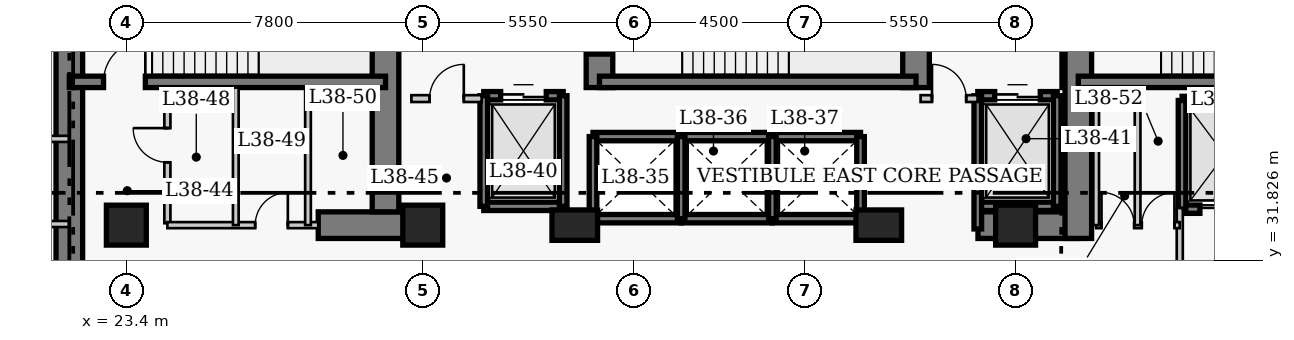
"""IFC4 building model, lengths in metres.
Left out: names, types, materials, properties, quantities, classifications, styles, units other than length and angle.
Written with IfcOpenShell. Run it as: python <this file> out.ifc"""

import sys

from ifc_helpers import new_model, si_unit, direction, frame, frame_2d, origin, origin_2d, place, context, subcontext, project, spatial, rectangle, extrude, element, fill, save


model = new_model("IFC4")
c1 = context("Model", 3, precision=1e-05, world=origin(), true_north=direction((0.0, 1.0)))
c2 = subcontext(c1, "Body", "Model", "MODEL_VIEW")
j1 = project(units=[si_unit("LENGTHUNIT", "METRE"), si_unit("PLANEANGLEUNIT", "RADIAN")], contexts=[c1])
p1 = place(None, origin())
s1 = spatial("IfcSite", under=j1, at=p1, CompositionType="ELEMENT")
p2 = place(p1, origin())
s2 = spatial("IfcBuilding", under=s1, at=p2, CompositionType="ELEMENT")
p3 = place(p2, frame((0.0, 0.0, 153.6)))
s3 = spatial("IfcBuildingStorey", under=s2, at=p3, CompositionType="ELEMENT", Elevation=153.6)
p4 = place(p3, frame((21.9, 27.05, 0.0), z_axis=(0.0, 0.0, 1.0), x_axis=(0.0, 1.0, 0.0)))
e1 = element("IfcWall", 1, at=p4, inside=s3, PredefinedType="SHEAR", context=c2, shape_type="SweptSolid", body=[
    extrude(rectangle(XDim=13.62, YDim=0.7, at=frame_2d((6.81, 0.0))), origin(), (0.0, 0.0, 1.0), 3.8),
])
p5 = place(p3, frame((28.45, 32.75, 0.0), z_axis=(0.0, 0.0, 1.0), x_axis=(1.0, 0.0, 0.0)))
e2 = element("IfcWall", 2, at=p5, inside=s3, PredefinedType="SHEAR", context=c2, shape_type="SweptSolid", body=[
    extrude(rectangle(XDim=2.4, YDim=0.7, at=frame_2d((1.2, 0.0))), origin(), (0.0, 0.0, 1.0), 3.8),
])
p6 = place(p3, frame((45.81, 32.75, 0.0), z_axis=(0.0, 0.0, 1.0), x_axis=(1.0, 0.0, 0.0)))
e3 = element("IfcWall", 3, at=p6, inside=s3, PredefinedType="SHEAR", context=c2, shape_type="SweptSolid", body=[
    extrude(rectangle(XDim=2.64, YDim=0.7, at=frame_2d((1.32, 0.0))), origin(), (0.0, 0.0, 1.0), 3.8),
])
p7 = place(p3, frame((30.22, 33.1, 0.0), z_axis=(0.0, 0.0, 1.0), x_axis=(0.0, 1.0, 0.0)))
e4 = element("IfcWall", 4, at=p7, inside=s3, PredefinedType="SHEAR", context=c2, shape_type="SweptSolid", body=[
    extrude(rectangle(XDim=7.22, YDim=0.7, at=frame_2d((3.61, 0.0))), origin(), (0.0, 0.0, 1.0), 3.8),
])
p8 = place(p3, frame((35.85, 36.37, 0.0), z_axis=(0.0, 0.0, 1.0), x_axis=(0.0, 1.0, 0.0)))
e5 = element("IfcWall", 5, at=p8, inside=s3, PredefinedType="SHEAR", context=c2, shape_type="SweptSolid", body=[
    extrude(rectangle(XDim=3.95, YDim=0.7, at=frame_2d((1.975, 0.0))), origin(), (0.0, 0.0, 1.0), 3.8),
])
p9 = place(p8, frame((0.88, 0.0, 0.0)))
e6 = element("IfcOpeningElement", 6, at=p9, cuts=e5, PredefinedType="OPENING", context=c2, shape_type="SweptSolid", body=[
    extrude(rectangle(XDim=1.1, YDim=2.15, at=frame_2d((0.55, 1.075))), frame((0.0, 0.36, 0.0), z_axis=(0.0, -1.0, 0.0), x_axis=(1.0, 0.0, 0.0)), (0.0, 0.0, 1.0), 0.72),
])
p10 = place(p3, frame((44.18, 36.37, 0.0), z_axis=(0.0, 0.0, 1.0), x_axis=(0.0, 1.0, 0.0)))
e7 = element("IfcWall", 7, at=p10, inside=s3, PredefinedType="SHEAR", context=c2, shape_type="SweptSolid", body=[
    extrude(rectangle(XDim=3.95, YDim=0.7, at=frame_2d((1.975, 0.0))), origin(), (0.0, 0.0, 1.0), 3.8),
])
p11 = place(p3, frame((48.45, 32.4, 0.0), z_axis=(0.0, 0.0, 1.0), x_axis=(0.0, 1.0, 0.0)))
e8 = element("IfcWall", 8, at=p11, inside=s3, PredefinedType="SHEAR", context=c2, shape_type="SweptSolid", body=[
    extrude(rectangle(XDim=7.92, YDim=0.7, at=frame_2d((3.96, 0.0))), origin(), (0.0, 0.0, 1.0), 3.8),
])
p12 = place(p11, frame((5.8, 0.0, 0.0)))
e9 = element("IfcOpeningElement", 9, at=p12, cuts=e8, PredefinedType="OPENING", context=c2, shape_type="SweptSolid", body=[
    extrude(rectangle(XDim=1.1, YDim=2.15, at=frame_2d((0.55, 1.075))), frame((0.0, 0.36, 0.0), z_axis=(0.0, -1.0, 0.0), x_axis=(1.0, 0.0, 0.0)), (0.0, 0.0, 1.0), 0.72),
])
p13 = place(p3, frame((21.9, 36.52, 0.0), z_axis=(0.0, 0.0, 1.0), x_axis=(1.0, 0.0, 0.0)))
e10 = element("IfcWall", 10, at=p13, inside=s3, PredefinedType="SHEAR", context=c2, shape_type="SweptSolid", body=[
    extrude(rectangle(XDim=8.32, YDim=0.3, at=frame_2d((4.16, 0.0))), origin(), (0.0, 0.0, 1.0), 3.8),
])
p14 = place(p13, frame((0.9, 0.0, 0.0)))
e11 = element("IfcOpeningElement", 11, at=p14, cuts=e10, PredefinedType="OPENING", context=c2, shape_type="SweptSolid", body=[
    extrude(rectangle(XDim=1.1, YDim=2.15, at=frame_2d((0.55, 1.075))), frame((0.0, 0.16, 0.0), z_axis=(0.0, -1.0, 0.0), x_axis=(1.0, 0.0, 0.0)), (0.0, 0.0, 1.0), 0.32),
])
p15 = place(p3, frame((35.85, 36.52, 0.0), z_axis=(0.0, 0.0, 1.0), x_axis=(1.0, 0.0, 0.0)))
e12 = element("IfcWall", 12, at=p15, inside=s3, PredefinedType="SHEAR", context=c2, shape_type="SweptSolid", body=[
    extrude(rectangle(XDim=8.33, YDim=0.3, at=frame_2d((4.165, 0.0))), origin(), (0.0, 0.0, 1.0), 3.8),
])
p16 = place(p3, frame((48.45, 36.52, 0.0), z_axis=(0.0, 0.0, 1.0), x_axis=(1.0, 0.0, 0.0)))
e13 = element("IfcWall", 13, at=p16, inside=s3, PredefinedType="SHEAR", context=c2, shape_type="SweptSolid", body=[
    extrude(rectangle(XDim=8.42, YDim=0.3, at=frame_2d((4.21, 0.0))), origin(), (0.0, 0.0, 1.0), 3.8),
])
for number, where, z_axis, x_axis in (
    (14, (23.4, 32.75, 0.0), (0.0, 0.0, 1.0), (1.0, 0.0, 0.0)),
    (15, (31.2, 32.75, 0.0), (0.0, 0.0, 1.0), (1.0, 0.0, 0.0)),
):
    element("IfcColumn", number, at=place(p3, frame(where, z_axis=z_axis, x_axis=x_axis)), inside=s3, PredefinedType="COLUMN", context=c2, shape_type="SweptSolid", body=[
        extrude(rectangle(XDim=1.05, YDim=1.05, at=origin_2d()), origin(), (0.0, 0.0, 1.0), 3.8),
    ])
for number, where, z_axis, x_axis in (
    (16, (35.2, 32.75, 0.0), (0.0, 0.0, 1.0), (1.0, 0.0, 0.0)),
    (17, (43.2, 32.75, 0.0), (0.0, 0.0, 1.0), (1.0, 0.0, 0.0)),
):
    element("IfcColumn", number, at=place(p3, frame(where, z_axis=z_axis, x_axis=x_axis)), inside=s3, PredefinedType="COLUMN", context=c2, shape_type="SweptSolid", body=[
        extrude(rectangle(XDim=1.2, YDim=0.8, at=origin_2d()), origin(), (0.0, 0.0, 1.0), 3.8),
    ])
p17 = place(p3, frame((46.8, 32.75, 0.0), z_axis=(0.0, 0.0, 1.0), x_axis=(1.0, 0.0, 0.0)))
e18 = element("IfcColumn", 18, at=p17, inside=s3, PredefinedType="COLUMN", context=c2, shape_type="SweptSolid", body=[
    extrude(rectangle(XDim=1.05, YDim=1.05, at=origin_2d()), origin(), (0.0, 0.0, 1.0), 3.8),
])
for number, where, z_axis, x_axis in (
    (19, (35.68, 35.08, 0.0), (0.0, 0.0, 1.0), (1.0, 0.0, 0.0)),
    (20, (35.68, 32.92, 0.0), (0.0, 0.0, 1.0), (1.0, 0.0, 0.0)),
):
    element("IfcWall", number, at=place(p3, frame(where, z_axis=z_axis, x_axis=x_axis)), inside=s3, PredefinedType="SHEAR", context=c2, shape_type="SweptSolid", body=[
        extrude(rectangle(XDim=2.32, YDim=0.22, at=frame_2d((1.16, 0.0))), origin(), (0.0, 0.0, 1.0), 3.8),
    ])
p18 = place(p3, frame((35.68, 32.92, 0.0), z_axis=(0.0, 0.0, 1.0), x_axis=(0.0, 1.0, 0.0)))
e21 = element("IfcWall", 21, at=p18, inside=s3, PredefinedType="SHEAR", context=c2, shape_type="SweptSolid", body=[
    extrude(rectangle(XDim=2.16, YDim=0.2, at=frame_2d((1.08, 0.0))), origin(), (0.0, 0.0, 1.0), 3.8),
])
for number, where, z_axis, x_axis in (
    (22, (38.0, 35.08, 0.0), (0.0, 0.0, 1.0), (1.0, 0.0, 0.0)),
    (23, (38.0, 32.92, 0.0), (0.0, 0.0, 1.0), (1.0, 0.0, 0.0)),
):
    element("IfcWall", number, at=place(p3, frame(where, z_axis=z_axis, x_axis=x_axis)), inside=s3, PredefinedType="SHEAR", context=c2, shape_type="SweptSolid", body=[
        extrude(rectangle(XDim=2.4, YDim=0.22, at=frame_2d((1.2, 0.0))), origin(), (0.0, 0.0, 1.0), 3.8),
    ])
p19 = place(p3, frame((38.0, 32.92, 0.0), z_axis=(0.0, 0.0, 1.0), x_axis=(0.0, 1.0, 0.0)))
e24 = element("IfcWall", 24, at=p19, inside=s3, PredefinedType="SHEAR", context=c2, shape_type="SweptSolid", body=[
    extrude(rectangle(XDim=2.16, YDim=0.2, at=frame_2d((1.08, 0.0))), origin(), (0.0, 0.0, 1.0), 3.8),
])
for number, where, z_axis, x_axis in (
    (25, (40.4, 35.08, 0.0), (0.0, 0.0, 1.0), (1.0, 0.0, 0.0)),
    (26, (40.4, 32.92, 0.0), (0.0, 0.0, 1.0), (1.0, 0.0, 0.0)),
):
    element("IfcWall", number, at=place(p3, frame(where, z_axis=z_axis, x_axis=x_axis)), inside=s3, PredefinedType="SHEAR", context=c2, shape_type="SweptSolid", body=[
        extrude(rectangle(XDim=2.32, YDim=0.22, at=frame_2d((1.16, 0.0))), origin(), (0.0, 0.0, 1.0), 3.8),
    ])
for number, where, z_axis, x_axis in (
    (27, (40.4, 32.92, 0.0), (0.0, 0.0, 1.0), (0.0, 1.0, 0.0)),
    (28, (42.72, 32.92, 0.0), (0.0, 0.0, 1.0), (0.0, 1.0, 0.0)),
):
    element("IfcWall", number, at=place(p3, frame(where, z_axis=z_axis, x_axis=x_axis)), inside=s3, PredefinedType="SHEAR", context=c2, shape_type="SweptSolid", body=[
        extrude(rectangle(XDim=2.16, YDim=0.2, at=frame_2d((1.08, 0.0))), origin(), (0.0, 0.0, 1.0), 3.8),
    ])
p20 = place(p3, frame((51.18, 36.03, 0.0), z_axis=(0.0, 0.0, 1.0), x_axis=(1.0, 0.0, 0.0)))
e29 = element("IfcWall", 29, at=p20, inside=s3, PredefinedType="SHEAR", context=c2, shape_type="SweptSolid", body=[
    extrude(rectangle(XDim=2.42, YDim=0.22, at=frame_2d((1.21, 0.0))), origin(), (0.0, 0.0, 1.0), 3.8),
])
p21 = place(p3, frame((51.18, 33.17, 0.0), z_axis=(0.0, 0.0, 1.0), x_axis=(1.0, 0.0, 0.0)))
e30 = element("IfcWall", 30, at=p21, inside=s3, PredefinedType="SHEAR", context=c2, shape_type="SweptSolid", body=[
    extrude(rectangle(XDim=2.42, YDim=0.22, at=frame_2d((1.21, 0.0))), origin(), (0.0, 0.0, 1.0), 3.8),
])
p22 = place(p21, frame((0.47, 0.0, 0.0)))
e31 = element("IfcOpeningElement", 31, at=p22, cuts=e30, PredefinedType="OPENING", context=c2, shape_type="SweptSolid", body=[
    extrude(rectangle(XDim=1.3, YDim=2.15, at=frame_2d((0.65, 1.075))), frame((0.0, 0.12, 0.0), z_axis=(0.0, -1.0, 0.0), x_axis=(1.0, 0.0, 0.0)), (0.0, 0.0, 1.0), 0.24),
])
p23 = place(p3, frame((51.18, 33.17, 0.0), z_axis=(0.0, 0.0, 1.0), x_axis=(0.0, 1.0, 0.0)))
e32 = element("IfcWall", 32, at=p23, inside=s3, PredefinedType="SHEAR", context=c2, shape_type="SweptSolid", body=[
    extrude(rectangle(XDim=2.86, YDim=0.2, at=frame_2d((1.43, 0.0))), origin(), (0.0, 0.0, 1.0), 3.8),
])
p24 = place(p3, frame((32.805, 36.155, 0.0), z_axis=(0.0, 0.0, 1.0), x_axis=(1.0, 0.0, 0.0)))
e33 = element("IfcWall", 33, at=p24, inside=s3, PredefinedType="SHEAR", context=c2, shape_type="SweptSolid", body=[
    extrude(rectangle(XDim=2.09, YDim=0.22, at=frame_2d((1.045, 0.0))), origin(), (0.0, 0.0, 1.0), 3.8),
])
p25 = place(p24, frame((0.445, 0.0, 0.0)))
e34 = element("IfcOpeningElement", 34, at=p25, cuts=e33, PredefinedType="OPENING", context=c2, shape_type="SweptSolid", body=[
    extrude(rectangle(XDim=1.2, YDim=2.15, at=frame_2d((0.6, 1.075))), frame((0.0, 0.12, 0.0), z_axis=(0.0, -1.0, 0.0), x_axis=(1.0, 0.0, 0.0)), (0.0, 0.0, 1.0), 0.24),
])
p26 = place(p3, frame((32.805, 33.245, 0.0), z_axis=(0.0, 0.0, 1.0), x_axis=(1.0, 0.0, 0.0)))
e35 = element("IfcWall", 35, at=p26, inside=s3, PredefinedType="SHEAR", context=c2, shape_type="SweptSolid", body=[
    extrude(rectangle(XDim=2.09, YDim=0.22, at=frame_2d((1.045, 0.0))), origin(), (0.0, 0.0, 1.0), 3.8),
])
for number, where, z_axis, x_axis in (
    (36, (32.805, 33.245, 0.0), (0.0, 0.0, 1.0), (0.0, 1.0, 0.0)),
    (37, (34.895, 33.245, 0.0), (0.0, 0.0, 1.0), (0.0, 1.0, 0.0)),
):
    element("IfcWall", number, at=place(p3, frame(where, z_axis=z_axis, x_axis=x_axis)), inside=s3, PredefinedType="SHEAR", context=c2, shape_type="SweptSolid", body=[
        extrude(rectangle(XDim=2.91, YDim=0.2, at=frame_2d((1.455, 0.0))), origin(), (0.0, 0.0, 1.0), 3.8),
    ])
p27 = place(p3, frame((45.805, 36.155, 0.0), z_axis=(0.0, 0.0, 1.0), x_axis=(1.0, 0.0, 0.0)))
e38 = element("IfcWall", 38, at=p27, inside=s3, PredefinedType="SHEAR", context=c2, shape_type="SweptSolid", body=[
    extrude(rectangle(XDim=2.09, YDim=0.22, at=frame_2d((1.045, 0.0))), origin(), (0.0, 0.0, 1.0), 3.8),
])
p28 = place(p27, frame((0.445, 0.0, 0.0)))
e39 = element("IfcOpeningElement", 39, at=p28, cuts=e38, PredefinedType="OPENING", context=c2, shape_type="SweptSolid", body=[
    extrude(rectangle(XDim=1.2, YDim=2.15, at=frame_2d((0.6, 1.075))), frame((0.0, 0.12, 0.0), z_axis=(0.0, -1.0, 0.0), x_axis=(1.0, 0.0, 0.0)), (0.0, 0.0, 1.0), 0.24),
])
p29 = place(p3, frame((45.805, 33.245, 0.0), z_axis=(0.0, 0.0, 1.0), x_axis=(1.0, 0.0, 0.0)))
e40 = element("IfcWall", 40, at=p29, inside=s3, PredefinedType="SHEAR", context=c2, shape_type="SweptSolid", body=[
    extrude(rectangle(XDim=2.09, YDim=0.22, at=frame_2d((1.045, 0.0))), origin(), (0.0, 0.0, 1.0), 3.8),
])
p30 = place(p3, frame((45.805, 32.65, 0.0), z_axis=(0.0, 0.0, 1.0), x_axis=(0.0, 1.0, 0.0)))
e41 = element("IfcWall", 41, at=p30, inside=s3, PredefinedType="SHEAR", context=c2, shape_type="SweptSolid", body=[
    extrude(rectangle(XDim=3.505, YDim=0.2, at=frame_2d((1.752, 0.0))), origin(), (0.0, 0.0, 1.0), 3.8),
])
p31 = place(p3, frame((47.895, 33.245, 0.0), z_axis=(0.0, 0.0, 1.0), x_axis=(0.0, 1.0, 0.0)))
e42 = element("IfcWall", 42, at=p31, inside=s3, PredefinedType="SHEAR", context=c2, shape_type="SweptSolid", body=[
    extrude(rectangle(XDim=2.91, YDim=0.2, at=frame_2d((1.455, 0.0))), origin(), (0.0, 0.0, 1.0), 3.8),
])
p32 = place(p3, frame((30.9, 36.08, 0.0), z_axis=(0.0, 0.0, 1.0), x_axis=(1.0, 0.0, 0.0)))
e43 = element("IfcWall", 43, at=p32, inside=s3, PredefinedType="PARTITIONING", context=c2, shape_type="SweptSolid", body=[
    extrude(rectangle(XDim=1.85, YDim=0.18, at=frame_2d((0.925, 0.0))), origin(), (0.0, 0.0, 1.0), 3.55),
])
p33 = place(p32, frame((0.48, 0.0, 0.0)))
e44 = element("IfcOpeningElement", 44, at=p33, cuts=e43, PredefinedType="OPENING", context=c2, shape_type="SweptSolid", body=[
    extrude(rectangle(XDim=0.9, YDim=2.15, at=frame_2d((0.45, 1.075))), frame((0.0, 0.1, 0.0), z_axis=(0.0, -1.0, 0.0), x_axis=(1.0, 0.0, 0.0)), (0.0, 0.0, 1.0), 0.2),
])
p34 = place(p3, frame((44.3, 36.08, 0.0), z_axis=(0.0, 0.0, 1.0), x_axis=(1.0, 0.0, 0.0)))
e45 = element("IfcWall", 45, at=p34, inside=s3, PredefinedType="PARTITIONING", context=c2, shape_type="SweptSolid", body=[
    extrude(rectangle(XDim=1.5, YDim=0.18, at=frame_2d((0.75, 0.0))), origin(), (0.0, 0.0, 1.0), 3.55),
])
p35 = place(p34, frame((0.3, 0.0, 0.0)))
e46 = element("IfcOpeningElement", 46, at=p35, cuts=e45, PredefinedType="OPENING", context=c2, shape_type="SweptSolid", body=[
    extrude(rectangle(XDim=0.9, YDim=2.15, at=frame_2d((0.45, 1.075))), frame((0.0, 0.1, 0.0), z_axis=(0.0, -1.0, 0.0), x_axis=(1.0, 0.0, 0.0)), (0.0, 0.0, 1.0), 0.2),
])
p36 = place(p3, frame((24.48, 32.8, 0.0), z_axis=(0.0, 0.0, 1.0), x_axis=(0.0, 1.0, 0.0)))
e47 = element("IfcWall", 47, at=p36, inside=s3, PredefinedType="PARTITIONING", context=c2, shape_type="SweptSolid", body=[
    extrude(rectangle(XDim=3.57, YDim=0.16, at=frame_2d((1.785, 0.0))), origin(), (0.0, 0.0, 1.0), 3.55),
])
p37 = place(p36, frame((1.604, 0.0, 0.0)))
e48 = element("IfcOpeningElement", 48, at=p37, cuts=e47, PredefinedType="OPENING", context=c2, shape_type="SweptSolid", body=[
    extrude(rectangle(XDim=0.9, YDim=2.1, at=frame_2d((0.45, 1.05))), frame((0.0, 0.09, 0.0), z_axis=(0.0, -1.0, 0.0), x_axis=(1.0, 0.0, 0.0)), (0.0, 0.0, 1.0), 0.18),
])
p38 = place(p3, frame((51.12, 29.5, 0.0), z_axis=(0.0, 0.0, 1.0), x_axis=(0.0, 1.0, 0.0)))
e49 = element("IfcWall", 49, at=p38, inside=s3, PredefinedType="PARTITIONING", context=c2, shape_type="SweptSolid", body=[
    extrude(rectangle(XDim=3.7, YDim=0.16, at=frame_2d((1.85, 0.0))), origin(), (0.0, 0.0, 1.0), 3.55),
])
p39 = place(p38, frame((0.9, 0.0, 0.0)))
e50 = element("IfcOpeningElement", 50, at=p39, cuts=e49, PredefinedType="OPENING", context=c2, shape_type="SweptSolid", body=[
    extrude(rectangle(XDim=1.1, YDim=2.15, at=frame_2d((0.55, 1.075))), frame((0.0, 0.09, 0.0), z_axis=(0.0, -1.0, 0.0), x_axis=(1.0, 0.0, 0.0)), (0.0, 0.0, 1.0), 0.18),
])
p40 = place(p3, frame((24.48, 32.75, 0.0), z_axis=(0.0, 0.0, 1.0), x_axis=(1.0, 0.0, 0.0)))
e51 = element("IfcWall", 51, at=p40, inside=s3, PredefinedType="PARTITIONING", context=c2, shape_type="SweptSolid", body=[
    extrude(rectangle(XDim=3.97, YDim=0.16, at=frame_2d((1.985, 0.0))), origin(), (0.0, 0.0, 1.0), 3.55),
])
p41 = place(p40, frame((2.31, 0.0, 0.0)))
e52 = element("IfcOpeningElement", 52, at=p41, cuts=e51, PredefinedType="OPENING", context=c2, shape_type="SweptSolid", body=[
    extrude(rectangle(XDim=0.86, YDim=2.05, at=frame_2d((0.43, 1.025))), frame((0.0, 0.09, 0.0), z_axis=(0.0, -1.0, 0.0), x_axis=(1.0, 0.0, 0.0)), (0.0, 0.0, 1.0), 0.18),
])
p42 = place(p3, frame((48.92, 32.75, 0.0), z_axis=(0.0, 0.0, 1.0), x_axis=(1.0, 0.0, 0.0)))
e53 = element("IfcWall", 53, at=p42, inside=s3, PredefinedType="PARTITIONING", context=c2, shape_type="SweptSolid", body=[
    extrude(rectangle(XDim=2.2, YDim=0.16, at=frame_2d((1.1, 0.0))), origin(), (0.0, 0.0, 1.0), 3.55),
])
p43 = place(p42, frame((0.14, 0.0, 0.0)))
e54 = element("IfcOpeningElement", 54, at=p43, cuts=e53, PredefinedType="OPENING", context=c2, shape_type="SweptSolid", body=[
    extrude(rectangle(XDim=0.86, YDim=2.05, at=frame_2d((0.43, 1.025))), frame((0.0, 0.09, 0.0), z_axis=(0.0, -1.0, 0.0), x_axis=(1.0, 0.0, 0.0)), (0.0, 0.0, 1.0), 0.18),
])
p44 = place(p42, frame((1.2, 0.0, 0.0)))
e55 = element("IfcOpeningElement", 55, at=p44, cuts=e53, PredefinedType="OPENING", context=c2, shape_type="SweptSolid", body=[
    extrude(rectangle(XDim=0.86, YDim=2.05, at=frame_2d((0.43, 1.025))), frame((0.0, 0.09, 0.0), z_axis=(0.0, -1.0, 0.0), x_axis=(1.0, 0.0, 0.0)), (0.0, 0.0, 1.0), 0.18),
])
for number, where, z_axis, x_axis in (
    (56, (48.92, 32.75, 0.0), (0.0, 0.0, 1.0), (0.0, 1.0, 0.0)),
    (57, (26.28, 32.75, 0.0), (0.0, 0.0, 1.0), (0.0, 1.0, 0.0)),
    (58, (28.18, 32.75, 0.0), (0.0, 0.0, 1.0), (0.0, 1.0, 0.0)),
    (59, (50.01, 32.75, 0.0), (0.0, 0.0, 1.0), (0.0, 1.0, 0.0)),
):
    element("IfcWall", number, at=place(p3, frame(where, z_axis=z_axis, x_axis=x_axis)), inside=s3, PredefinedType="PARTITIONING", context=c2, shape_type="SweptSolid", body=[
        extrude(rectangle(XDim=3.62, YDim=0.15, at=frame_2d((1.81, 0.0))), origin(), (0.0, 0.0, 1.0), 3.55),
    ])
for number, where, z_axis, x_axis in (
    (60, (19.41, 35.02, 0.0), (0.0, 0.0, 1.0), (1.0, 0.0, 0.0)),
    (61, (19.41, 32.78, 0.0), (0.0, 0.0, 1.0), (1.0, 0.0, 0.0)),
):
    element("IfcWall", number, at=place(p3, frame(where, z_axis=z_axis, x_axis=x_axis)), inside=s3, PredefinedType="PARTITIONING", context=c2, shape_type="SweptSolid", body=[
        extrude(rectangle(XDim=2.49, YDim=0.16, at=frame_2d((1.245, 0.0))), origin(), (0.0, 0.0, 1.0), 3.55),
    ])
p45 = place(p22, origin())
e62 = element("IfcDoor", 62, at=p45, inside=s3, OperationType="DOUBLE_DOOR_SLIDING", PredefinedType="DOOR", context=c2, shape_type="SweptSolid", body=[
    extrude(rectangle(XDim=1.3, YDim=2.15, at=frame_2d((0.65, 1.075))), frame((0.0, 0.025, 0.0), z_axis=(0.0, -1.0, 0.0), x_axis=(1.0, 0.0, 0.0)), (0.0, 0.0, 1.0), 0.05),
])
fill(e31, e62)
p46 = place(p25, origin())
e63 = element("IfcDoor", 63, at=p46, inside=s3, OperationType="DOUBLE_DOOR_SLIDING", PredefinedType="DOOR", context=c2, shape_type="SweptSolid", body=[
    extrude(rectangle(XDim=1.2, YDim=2.15, at=frame_2d((0.6, 1.075))), frame((0.0, 0.025, 0.0), z_axis=(0.0, -1.0, 0.0), x_axis=(1.0, 0.0, 0.0)), (0.0, 0.0, 1.0), 0.05),
])
fill(e34, e63)
p47 = place(p28, origin())
e64 = element("IfcDoor", 64, at=p47, inside=s3, OperationType="DOUBLE_DOOR_SLIDING", PredefinedType="DOOR", context=c2, shape_type="SweptSolid", body=[
    extrude(rectangle(XDim=1.2, YDim=2.15, at=frame_2d((0.6, 1.075))), frame((0.0, 0.025, 0.0), z_axis=(0.0, -1.0, 0.0), x_axis=(1.0, 0.0, 0.0)), (0.0, 0.0, 1.0), 0.05),
])
fill(e39, e64)
p48 = place(p33, origin())
e65 = element("IfcDoor", 65, at=p48, inside=s3, OperationType="SINGLE_SWING_RIGHT", PredefinedType="DOOR", context=c2, shape_type="SweptSolid", body=[
    extrude(rectangle(XDim=0.9, YDim=2.15, at=frame_2d((0.45, 1.075))), frame((0.0, 0.025, 0.0), z_axis=(0.0, -1.0, 0.0), x_axis=(1.0, 0.0, 0.0)), (0.0, 0.0, 1.0), 0.05),
])
fill(e44, e65)
p49 = place(p35, origin())
e66 = element("IfcDoor", 66, at=p49, inside=s3, OperationType="SINGLE_SWING_LEFT", PredefinedType="DOOR", context=c2, shape_type="SweptSolid", body=[
    extrude(rectangle(XDim=0.9, YDim=2.15, at=frame_2d((0.45, 1.075))), frame((0.0, 0.025, 0.0), z_axis=(0.0, -1.0, 0.0), x_axis=(1.0, 0.0, 0.0)), (0.0, 0.0, 1.0), 0.05),
])
fill(e46, e66)
p50 = place(p37, origin())
e67 = element("IfcDoor", 67, at=p50, inside=s3, OperationType="SINGLE_SWING_RIGHT", PredefinedType="DOOR", context=c2, shape_type="SweptSolid", body=[
    extrude(rectangle(XDim=0.9, YDim=2.1, at=frame_2d((0.45, 1.05))), frame((0.0, 0.025, 0.0), z_axis=(0.0, -1.0, 0.0), x_axis=(1.0, 0.0, 0.0)), (0.0, 0.0, 1.0), 0.05),
])
fill(e48, e67)
p51 = place(p41, origin())
e68 = element("IfcDoor", 68, at=p51, inside=s3, OperationType="SINGLE_SWING_RIGHT", PredefinedType="DOOR", context=c2, shape_type="SweptSolid", body=[
    extrude(rectangle(XDim=0.86, YDim=2.05, at=frame_2d((0.43, 1.025))), frame((0.0, 0.025, 0.0), z_axis=(0.0, -1.0, 0.0), x_axis=(1.0, 0.0, 0.0)), (0.0, 0.0, 1.0), 0.05),
])
fill(e52, e68)
p52 = place(p43, origin())
e69 = element("IfcDoor", 69, at=p52, inside=s3, OperationType="SINGLE_SWING_LEFT", PredefinedType="DOOR", context=c2, shape_type="SweptSolid", body=[
    extrude(rectangle(XDim=0.86, YDim=2.05, at=frame_2d((0.43, 1.025))), frame((0.0, 0.025, 0.0), z_axis=(0.0, -1.0, 0.0), x_axis=(1.0, 0.0, 0.0)), (0.0, 0.0, 1.0), 0.05),
])
fill(e54, e69)
p53 = place(p44, origin())
e70 = element("IfcDoor", 70, at=p53, inside=s3, OperationType="SINGLE_SWING_RIGHT", PredefinedType="DOOR", context=c2, shape_type="SweptSolid", body=[
    extrude(rectangle(XDim=0.86, YDim=2.05, at=frame_2d((0.43, 1.025))), frame((0.0, 0.025, 0.0), z_axis=(0.0, -1.0, 0.0), x_axis=(1.0, 0.0, 0.0)), (0.0, 0.0, 1.0), 0.05),
])
fill(e55, e70)
p54 = place(p14, origin())
e71 = element("IfcDoor", 71, at=p54, inside=s3, OperationType="SINGLE_SWING_RIGHT", PredefinedType="DOOR", context=c2, shape_type="SweptSolid", body=[
    extrude(rectangle(XDim=1.1, YDim=2.15, at=frame_2d((0.55, 1.075))), frame((0.0, 0.025, 0.0), z_axis=(0.0, -1.0, 0.0), x_axis=(1.0, 0.0, 0.0)), (0.0, 0.0, 1.0), 0.05),
])
fill(e11, e71)
p55 = place(p9, origin())
e72 = element("IfcDoor", 72, at=p55, inside=s3, OperationType="SINGLE_SWING_RIGHT", PredefinedType="DOOR", context=c2, shape_type="SweptSolid", body=[
    extrude(rectangle(XDim=1.1, YDim=2.15, at=frame_2d((0.55, 1.075))), frame((0.0, 0.025, 0.0), z_axis=(0.0, -1.0, 0.0), x_axis=(1.0, 0.0, 0.0)), (0.0, 0.0, 1.0), 0.05),
])
fill(e6, e72)
save(model, sys.argv[1])
